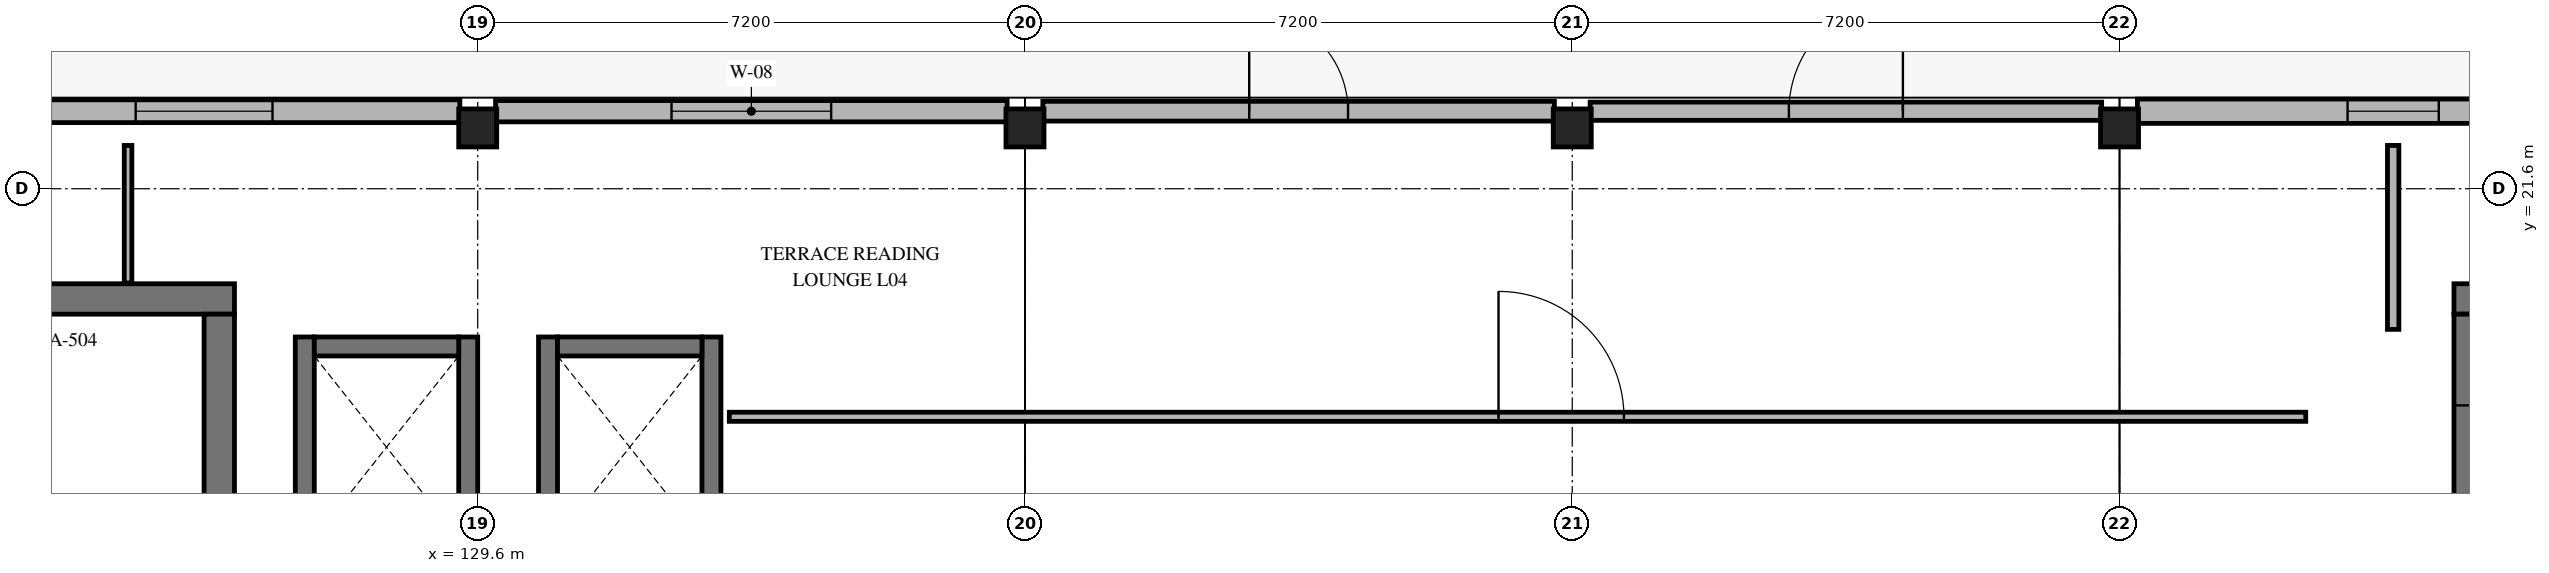
"""IFC4 building model, lengths in metres.
Left out: names, types, materials, properties, quantities, classifications, styles, units other than length and angle.
Written with IfcOpenShell. Run it as: python <this file> out.ifc"""

import sys

from ifc_helpers import new_model, si_unit, direction, frame, frame_2d, origin, origin_2d, place, context, subcontext, project, spatial, rectangle, extrude, element, fill, save


model = new_model("IFC4")
c1 = context("Model", 3, precision=1e-05, world=origin(), true_north=direction((0.0, 1.0)))
c2 = subcontext(c1, "Body", "Model", "MODEL_VIEW")
j1 = project(units=[si_unit("LENGTHUNIT", "METRE"), si_unit("PLANEANGLEUNIT", "RADIAN")], contexts=[c1])
p1 = place(None, origin())
s1 = spatial("IfcSite", under=j1, at=p1, CompositionType="ELEMENT")
p2 = place(p1, origin())
s2 = spatial("IfcBuilding", under=s1, at=p2, CompositionType="ELEMENT")
p3 = place(p2, frame((0.0, 0.0, 16.8)))
s3 = spatial("IfcBuildingStorey", under=s2, at=p3, CompositionType="ELEMENT", Elevation=16.8)
for number, where, z_axis, x_axis in (
    (1, (129.6, 22.4, 0.0), (0.0, 0.0, 1.0), (1.0, 0.0, 0.0)),
    (2, (136.8, 22.4, 0.0), (0.0, 0.0, 1.0), (1.0, 0.0, 0.0)),
    (3, (144.0, 22.4, 0.0), (0.0, 0.0, 1.0), (1.0, 0.0, 0.0)),
    (4, (151.2, 22.4, 0.0), (0.0, 0.0, 1.0), (1.0, 0.0, 0.0)),
):
    element("IfcColumn", number, at=place(p3, frame(where, z_axis=z_axis, x_axis=x_axis)), inside=s3, PredefinedType="COLUMN", context=c2, shape_type="SweptSolid", body=[
        extrude(rectangle(XDim=0.5, YDim=0.5, at=origin_2d()), origin(), (0.0, 0.0, 1.0), 3.9),
    ])
p4 = place(p3, frame((122.635, 22.62, 0.0), z_axis=(0.0, 0.0, 1.0), x_axis=(1.0, 0.0, 0.0)))
e5 = element("IfcWall", 5, at=p4, inside=s3, PredefinedType="SOLIDWALL", context=c2, shape_type="SweptSolid", body=[
    extrude(rectangle(XDim=6.73, YDim=0.3, at=frame_2d((3.365, 0.0))), origin(), (0.0, 0.0, 1.0), 2.98),
])
p5 = place(p4, frame((2.465, 0.0, 0.9)))
e6 = element("IfcOpeningElement", 6, at=p5, cuts=e5, PredefinedType="OPENING", context=c2, shape_type="SweptSolid", body=[
    extrude(rectangle(XDim=1.8, YDim=1.2, at=frame_2d((0.9, 0.6))), frame((0.0, 0.16, 0.0), z_axis=(0.0, -1.0, 0.0), x_axis=(1.0, 0.0, 0.0)), (0.0, 0.0, 1.0), 0.32),
])
p6 = place(p3, frame((129.835, 22.62, 0.0), z_axis=(0.0, 0.0, 1.0), x_axis=(1.0, 0.0, 0.0)))
e7 = element("IfcWall", 7, at=p6, inside=s3, PredefinedType="SOLIDWALL", context=c2, shape_type="SweptSolid", body=[
    extrude(rectangle(XDim=6.73, YDim=0.28, at=frame_2d((3.365, 0.0))), origin(), (0.0, 0.0, 1.0), 3.03),
])
p7 = place(p6, frame((2.315, 0.0, 0.9)))
e8 = element("IfcOpeningElement", 8, at=p7, cuts=e7, PredefinedType="OPENING", context=c2, shape_type="SweptSolid", body=[
    extrude(rectangle(XDim=2.1, YDim=1.2, at=frame_2d((1.05, 0.6))), frame((0.0, 0.15, 0.0), z_axis=(0.0, -1.0, 0.0), x_axis=(1.0, 0.0, 0.0)), (0.0, 0.0, 1.0), 0.3),
])
p8 = place(p3, frame((137.035, 22.62, 0.0), z_axis=(0.0, 0.0, 1.0), x_axis=(1.0, 0.0, 0.0)))
e9 = element("IfcWall", 9, at=p8, inside=s3, PredefinedType="SOLIDWALL", context=c2, shape_type="SweptSolid", body=[
    extrude(rectangle(XDim=6.73, YDim=0.26, at=frame_2d((3.365, 0.0))), origin(), (0.0, 0.0, 1.0), 3.08),
])
p9 = place(p8, frame((2.715, 0.0, 0.0)))
e10 = element("IfcOpeningElement", 10, at=p9, cuts=e9, PredefinedType="OPENING", context=c2, shape_type="SweptSolid", body=[
    extrude(rectangle(XDim=1.3, YDim=2.2, at=frame_2d((0.65, 1.1))), frame((0.0, 0.14, 0.0), z_axis=(0.0, -1.0, 0.0), x_axis=(1.0, 0.0, 0.0)), (0.0, 0.0, 1.0), 0.28),
])
p10 = place(p3, frame((144.235, 22.62, 0.0), z_axis=(0.0, 0.0, 1.0), x_axis=(1.0, 0.0, 0.0)))
e11 = element("IfcWall", 11, at=p10, inside=s3, PredefinedType="SOLIDWALL", context=c2, shape_type="SweptSolid", body=[
    extrude(rectangle(XDim=6.73, YDim=0.24, at=frame_2d((3.365, 0.0))), origin(), (0.0, 0.0, 1.0), 2.88),
])
p11 = place(p10, frame((2.615, 0.0, 0.0)))
e12 = element("IfcOpeningElement", 12, at=p11, cuts=e11, PredefinedType="OPENING", context=c2, shape_type="SweptSolid", body=[
    extrude(rectangle(XDim=1.5, YDim=2.2, at=frame_2d((0.75, 1.1))), frame((0.0, 0.13, 0.0), z_axis=(0.0, -1.0, 0.0), x_axis=(1.0, 0.0, 0.0)), (0.0, 0.0, 1.0), 0.26),
])
p12 = place(p3, frame((151.435, 22.62, 0.0), z_axis=(0.0, 0.0, 1.0), x_axis=(1.0, 0.0, 0.0)))
e13 = element("IfcWall", 13, at=p12, inside=s3, PredefinedType="SOLIDWALL", context=c2, shape_type="SweptSolid", body=[
    extrude(rectangle(XDim=6.73, YDim=0.32, at=frame_2d((3.365, 0.0))), origin(), (0.0, 0.0, 1.0), 2.93),
])
p13 = place(p12, frame((2.765, 0.0, 0.9)))
e14 = element("IfcOpeningElement", 14, at=p13, cuts=e13, PredefinedType="OPENING", context=c2, shape_type="SweptSolid", body=[
    extrude(rectangle(XDim=1.2, YDim=1.35, at=frame_2d((0.6, 0.675))), frame((0.0, 0.17, 0.0), z_axis=(0.0, -1.0, 0.0), x_axis=(1.0, 0.0, 0.0)), (0.0, 0.0, 1.0), 0.34),
])
p14 = place(p3, frame((126.4, 20.15, 0.0), z_axis=(0.0, 0.0, 1.0), x_axis=(-1.0, 0.0, 0.0)))
e15 = element("IfcWall", 15, at=p14, inside=s3, PredefinedType="SHEAR", context=c2, shape_type="SweptSolid", body=[
    extrude(rectangle(XDim=9.2, YDim=0.4, at=frame_2d((4.6, 0.0))), origin(), (0.0, 0.0, 1.0), 3.68),
])
p15 = place(p3, frame((126.2, 16.2, 0.0), z_axis=(0.0, 0.0, 1.0), x_axis=(0.0, 1.0, 0.0)))
e16 = element("IfcWall", 16, at=p15, inside=s3, PredefinedType="SHEAR", context=c2, shape_type="SweptSolid", body=[
    extrude(rectangle(XDim=3.75, YDim=0.4, at=frame_2d((1.875, 0.0))), origin(), (0.0, 0.0, 1.0), 3.68),
])
p16 = place(p3, frame((164.8, 20.15, 0.0), z_axis=(0.0, 0.0, 1.0), x_axis=(-1.0, 0.0, 0.0)))
e17 = element("IfcWall", 17, at=p16, inside=s3, PredefinedType="SHEAR", context=c2, shape_type="SweptSolid", body=[
    extrude(rectangle(XDim=9.2, YDim=0.4, at=frame_2d((4.6, 0.0))), origin(), (0.0, 0.0, 1.0), 3.68),
])
p17 = place(p3, frame((155.8, 19.95, 0.0), z_axis=(0.0, 0.0, 1.0), x_axis=(0.0, -1.0, 0.0)))
e18 = element("IfcWall", 18, at=p17, inside=s3, PredefinedType="SHEAR", context=c2, shape_type="SweptSolid", body=[
    extrude(rectangle(XDim=3.75, YDim=0.4, at=frame_2d((1.875, 0.0))), origin(), (0.0, 0.0, 1.0), 3.68),
])
p18 = place(p17, frame((1.2, 0.0, 0.0)))
e19 = element("IfcOpeningElement", 19, at=p18, cuts=e18, PredefinedType="OPENING", context=c2, shape_type="SweptSolid", body=[
    extrude(rectangle(XDim=1.35, YDim=2.2, at=frame_2d((0.675, 1.1))), frame((0.0, 0.21, 0.0), z_axis=(0.0, -1.0, 0.0), x_axis=(1.0, 0.0, 0.0)), (0.0, 0.0, 1.0), 0.42),
])
for number, where, z_axis, x_axis in (
    (20, (127.325, 16.75, 0.0), (0.0, 0.0, 1.0), (0.0, 1.0, 0.0)),
    (21, (129.475, 19.65, 0.0), (0.0, 0.0, 1.0), (0.0, -1.0, 0.0)),
):
    element("IfcWall", number, at=place(p3, frame(where, z_axis=z_axis, x_axis=x_axis)), inside=s3, PredefinedType="SOLIDWALL", context=c2, shape_type="SweptSolid", body=[
        extrude(rectangle(XDim=2.9, YDim=0.25, at=frame_2d((1.45, 0.0))), origin(), (0.0, 0.0, 1.0), 3.68),
    ])
p19 = place(p3, frame((129.35, 19.525, 0.0), z_axis=(0.0, 0.0, 1.0), x_axis=(-1.0, 0.0, 0.0)))
e22 = element("IfcWall", 22, at=p19, inside=s3, PredefinedType="SOLIDWALL", context=c2, shape_type="SweptSolid", body=[
    extrude(rectangle(XDim=1.9, YDim=0.25, at=frame_2d((0.95, 0.0))), origin(), (0.0, 0.0, 1.0), 3.68),
])
for number, where, z_axis, x_axis in (
    (23, (130.525, 16.75, 0.0), (0.0, 0.0, 1.0), (0.0, 1.0, 0.0)),
    (24, (132.675, 19.65, 0.0), (0.0, 0.0, 1.0), (0.0, -1.0, 0.0)),
):
    element("IfcWall", number, at=place(p3, frame(where, z_axis=z_axis, x_axis=x_axis)), inside=s3, PredefinedType="SOLIDWALL", context=c2, shape_type="SweptSolid", body=[
        extrude(rectangle(XDim=2.9, YDim=0.25, at=frame_2d((1.45, 0.0))), origin(), (0.0, 0.0, 1.0), 3.68),
    ])
p20 = place(p3, frame((132.55, 19.525, 0.0), z_axis=(0.0, 0.0, 1.0), x_axis=(-1.0, 0.0, 0.0)))
e25 = element("IfcWall", 25, at=p20, inside=s3, PredefinedType="SOLIDWALL", context=c2, shape_type="SweptSolid", body=[
    extrude(rectangle(XDim=1.9, YDim=0.25, at=frame_2d((0.95, 0.0))), origin(), (0.0, 0.0, 1.0), 3.68),
])
p21 = place(p3, frame((132.91, 18.6, 0.0), z_axis=(0.0, 0.0, 1.0), x_axis=(1.0, 0.0, 0.0)))
e26 = element("IfcWall", 26, at=p21, inside=s3, PredefinedType="PARTITIONING", context=c2, shape_type="SweptSolid", body=[
    extrude(rectangle(XDim=20.74, YDim=0.12, at=frame_2d((10.37, 0.0))), origin(), (0.0, 0.0, 1.0), 2.88),
])
p22 = place(p21, frame((10.12, 0.0, 0.0)))
e27 = element("IfcOpeningElement", 27, at=p22, cuts=e26, PredefinedType="OPENING", context=c2, shape_type="SweptSolid", body=[
    extrude(rectangle(XDim=1.65, YDim=2.3, at=frame_2d((0.825, 1.15))), frame((0.0, 0.07, 0.0), z_axis=(0.0, -1.0, 0.0), x_axis=(1.0, 0.0, 0.0)), (0.0, 0.0, 1.0), 0.14),
])
p23 = place(p3, frame((125.0, 22.17, 0.0), z_axis=(0.0, 0.0, 1.0), x_axis=(0.0, -1.0, 0.0)))
e28 = element("IfcWall", 28, at=p23, inside=s3, PredefinedType="PARTITIONING", context=c2, shape_type="SweptSolid", body=[
    extrude(rectangle(XDim=1.81, YDim=0.1, at=frame_2d((0.905, 0.0))), origin(), (0.0, 0.0, 1.0), 3.68),
])
p24 = place(p3, frame((154.8, 19.75, 0.0), z_axis=(0.0, 0.0, 1.0), x_axis=(0.0, 1.0, 0.0)))
e29 = element("IfcWall", 29, at=p24, inside=s3, PredefinedType="PARTITIONING", context=c2, shape_type="SweptSolid", body=[
    extrude(rectangle(XDim=2.42, YDim=0.15, at=frame_2d((1.21, 0.0))), origin(), (0.0, 0.0, 1.0), 2.93),
])
p25 = place(p5, origin())
e30 = element("IfcWindow", 30, at=p25, inside=s3, PartitioningType="SINGLE_PANEL", PredefinedType="WINDOW", context=c2, shape_type="SweptSolid", body=[
    extrude(rectangle(XDim=1.8, YDim=1.2, at=frame_2d((0.9, 0.6))), frame((0.0, 0.03, 0.0), z_axis=(0.0, -1.0, 0.0), x_axis=(1.0, 0.0, 0.0)), (0.0, 0.0, 1.0), 0.06),
])
fill(e6, e30)
p26 = place(p7, origin())
e31 = element("IfcWindow", 31, at=p26, inside=s3, PartitioningType="SINGLE_PANEL", PredefinedType="WINDOW", context=c2, shape_type="SweptSolid", body=[
    extrude(rectangle(XDim=2.1, YDim=1.2, at=frame_2d((1.05, 0.6))), frame((0.0, 0.03, 0.0), z_axis=(0.0, -1.0, 0.0), x_axis=(1.0, 0.0, 0.0)), (0.0, 0.0, 1.0), 0.06),
])
fill(e8, e31)
p27 = place(p9, origin())
e32 = element("IfcDoor", 32, at=p27, inside=s3, OperationType="SINGLE_SWING_LEFT", PredefinedType="DOOR", context=c2, shape_type="SweptSolid", body=[
    extrude(rectangle(XDim=1.3, YDim=2.2, at=frame_2d((0.65, 1.1))), frame((0.0, 0.025, 0.0), z_axis=(0.0, -1.0, 0.0), x_axis=(1.0, 0.0, 0.0)), (0.0, 0.0, 1.0), 0.05),
])
fill(e10, e32)
p28 = place(p11, origin())
e33 = element("IfcDoor", 33, at=p28, inside=s3, OperationType="SINGLE_SWING_RIGHT", PredefinedType="DOOR", context=c2, shape_type="SweptSolid", body=[
    extrude(rectangle(XDim=1.5, YDim=2.2, at=frame_2d((0.75, 1.1))), frame((0.0, 0.025, 0.0), z_axis=(0.0, -1.0, 0.0), x_axis=(1.0, 0.0, 0.0)), (0.0, 0.0, 1.0), 0.05),
])
fill(e12, e33)
p29 = place(p13, origin())
e34 = element("IfcWindow", 34, at=p29, inside=s3, PartitioningType="SINGLE_PANEL", PredefinedType="WINDOW", context=c2, shape_type="SweptSolid", body=[
    extrude(rectangle(XDim=1.2, YDim=1.35, at=frame_2d((0.6, 0.675))), frame((0.0, 0.03, 0.0), z_axis=(0.0, -1.0, 0.0), x_axis=(1.0, 0.0, 0.0)), (0.0, 0.0, 1.0), 0.06),
])
fill(e14, e34)
p30 = place(p18, origin())
e35 = element("IfcDoor", 35, at=p30, inside=s3, OperationType="SINGLE_SWING_LEFT", PredefinedType="DOOR", context=c2, shape_type="SweptSolid", body=[
    extrude(rectangle(XDim=1.35, YDim=2.2, at=frame_2d((0.675, 1.1))), frame((0.0, 0.025, 0.0), z_axis=(0.0, -1.0, 0.0), x_axis=(1.0, 0.0, 0.0)), (0.0, 0.0, 1.0), 0.05),
])
fill(e19, e35)
p31 = place(p22, origin())
e36 = element("IfcDoor", 36, at=p31, inside=s3, OperationType="SINGLE_SWING_LEFT", PredefinedType="DOOR", context=c2, shape_type="SweptSolid", body=[
    extrude(rectangle(XDim=1.65, YDim=2.3, at=frame_2d((0.825, 1.15))), frame((0.0, 0.025, 0.0), z_axis=(0.0, -1.0, 0.0), x_axis=(1.0, 0.0, 0.0)), (0.0, 0.0, 1.0), 0.05),
])
fill(e27, e36)
save(model, sys.argv[1])
